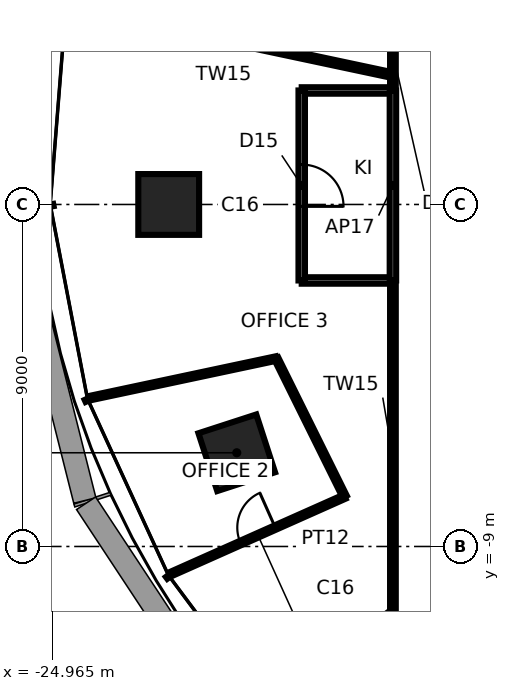
"""IFC4 building model, lengths in metres.
Left out: names, types, materials, properties, quantities, classifications, styles, units other than length and angle.
Written with IfcOpenShell. Run it as: python <this file> out.ifc"""

import sys

from ifc_helpers import new_model, si_unit, direction, frame, frame_2d, origin, origin_2d, place, context, subcontext, project, spatial, rectangle, extrude, element, fill, save


model = new_model("IFC4")
c1 = context("Model", 3, precision=1e-05, world=origin(), true_north=direction((0.0, 1.0)))
c2 = subcontext(c1, "Body", "Model", "MODEL_VIEW")
j1 = project(units=[si_unit("LENGTHUNIT", "METRE"), si_unit("PLANEANGLEUNIT", "RADIAN")], contexts=[c1])
p1 = place(None, origin())
s1 = spatial("IfcSite", under=j1, at=p1, CompositionType="ELEMENT")
p2 = place(p1, origin())
s2 = spatial("IfcBuilding", under=s1, at=p2, CompositionType="ELEMENT")
p3 = place(p2, frame((0.0, 0.0, 115.8)))
s3 = spatial("IfcBuildingStorey", under=s2, at=p3, CompositionType="ELEMENT", Elevation=115.8)
for number, where, z_axis, x_axis in (
    (1, (-21.9, 0.0, 0.0), (0.0, 0.0, 1.0), (-1.0, 0.0, 0.0)),
    (2, (-20.109, -6.534, 0.0), (0.0, 0.0, 1.0), (-0.951, -0.309, 0.0)),
):
    element("IfcColumn", number, at=place(p3, frame(where, z_axis=z_axis, x_axis=x_axis)), inside=s3, PredefinedType="COLUMN", context=c2, shape_type="SweptSolid", body=[
        extrude(rectangle(XDim=1.6, YDim=1.6, at=origin_2d()), origin(), (0.0, 0.0, 1.0), 3.9),
    ])
p4 = place(p3, frame((-18.4, -2.0, 0.0), z_axis=(0.0, 0.0, 1.0), x_axis=(1.0, 0.0, 0.0)))
e3 = element("IfcWall", 3, at=p4, inside=s3, PredefinedType="PARTITIONING", context=c2, shape_type="SweptSolid", body=[
    extrude(rectangle(XDim=2.4, YDim=0.17, at=frame_2d((1.2, 0.0))), origin(), (0.0, 0.0, 1.0), 3.74),
])
p5 = place(p3, frame((-19.07, -4.053, 0.0), z_axis=(0.0, 0.0, 1.0), x_axis=(-0.978149046495, -0.207904888932, 0.0)))
e4 = element("IfcWall", 4, at=p5, inside=s3, PredefinedType="PARTITIONING", context=c2, shape_type="SweptSolid", body=[
    extrude(rectangle(XDim=5.0, YDim=0.12, at=frame_2d((2.5, 0.0))), origin(), (0.0, 0.0, 1.0), 3.74),
])
p6 = place(p3, frame((-17.268, -7.688, 0.0), z_axis=(0.0, 0.0, 1.0), x_axis=(-0.444009146511, 0.896022252968, 0.0)))
e5 = element("IfcWall", 5, at=p6, inside=s3, PredefinedType="PARTITIONING", context=c2, shape_type="SweptSolid", body=[
    extrude(rectangle(XDim=4.057, YDim=0.12, at=frame_2d((2.028, 0.0))), origin(), (0.0, 0.0, 1.0), 3.286),
])
p7 = place(p3, frame((-16.0, -2.0, 0.0), z_axis=(0.0, 0.0, 1.0), x_axis=(0.0, -1.0, 0.0)))
e6 = element("IfcWall", 6, at=p7, inside=s3, PredefinedType="PARTITIONING", context=c2, shape_type="SweptSolid", body=[
    extrude(rectangle(XDim=9.3, YDim=0.15, at=frame_2d((4.65, 0.0))), origin(), (0.0, 0.0, 1.0), 3.74),
])
p8 = place(p3, frame((-21.836, -9.722, 0.0), z_axis=(0.0, 0.0, 1.0), x_axis=(0.913549606868, 0.406727323635, 0.0)))
e7 = element("IfcWall", 7, at=p8, inside=s3, PredefinedType="PARTITIONING", context=c2, shape_type="SweptSolid", body=[
    extrude(rectangle(XDim=5.0, YDim=0.12, at=frame_2d((2.5, 0.0))), origin(), (0.0, 0.0, 1.0), 3.74),
])
p9 = place(p8, frame((2.0, 0.0, 0.0)))
e8 = element("IfcOpeningElement", 8, at=p9, cuts=e7, PredefinedType="OPENING", context=c2, shape_type="SweptSolid", body=[
    extrude(rectangle(XDim=1.0, YDim=2.4, at=frame_2d((0.5, 1.2))), frame((0.0, 0.07, 0.0), z_axis=(0.0, -1.0, 0.0), x_axis=(1.0, 0.0, 0.0)), (0.0, 0.0, 1.0), 0.14),
])
p10 = place(p3, frame((-16.0, 11.3, 0.0), z_axis=(0.0, 0.0, 1.0), x_axis=(0.0, -1.0, 0.0)))
e9 = element("IfcWall", 9, at=p10, inside=s3, PredefinedType="PARTITIONING", context=c2, shape_type="SweptSolid", body=[
    extrude(rectangle(XDim=8.3, YDim=0.15, at=frame_2d((4.15, 0.0))), origin(), (0.0, 0.0, 1.0), 3.74),
])
p11 = place(p3, frame((-16.0, 3.401, 0.0), z_axis=(0.0, 0.0, 1.0), x_axis=(-0.978149592602, 0.207902319596, 0.0)))
e10 = element("IfcWall", 10, at=p11, inside=s3, PredefinedType="PARTITIONING", context=c2, shape_type="SweptSolid", body=[
    extrude(rectangle(XDim=8.713, YDim=0.15, at=frame_2d((4.357, 0.0))), origin(), (0.0, 0.0, 1.0), 3.74),
])
p12 = place(p3, frame((-16.0, 3.0, 0.0), z_axis=(0.0, 0.0, 1.0), x_axis=(-1.0, 0.0, 0.0)))
e11 = element("IfcWall", 11, at=p12, inside=s3, PredefinedType="PARTITIONING", context=c2, shape_type="SweptSolid", body=[
    extrude(rectangle(XDim=2.4, YDim=0.17, at=frame_2d((1.2, 0.0))), origin(), (0.0, 0.0, 1.0), 3.74),
])
p13 = place(p3, frame((-16.0, -2.0, 0.0), z_axis=(0.0, 0.0, 1.0), x_axis=(0.0, 1.0, 0.0)))
e12 = element("IfcWall", 12, at=p13, inside=s3, PredefinedType="PARTITIONING", context=c2, shape_type="SweptSolid", body=[
    extrude(rectangle(XDim=5.0, YDim=0.17, at=frame_2d((2.5, 0.0))), origin(), (0.0, 0.0, 1.0), 3.74),
])
p14 = place(p3, frame((-18.4, 3.0, 0.0), z_axis=(0.0, 0.0, 1.0), x_axis=(0.0, -1.0, 0.0)))
e13 = element("IfcWall", 13, at=p14, inside=s3, PredefinedType="PARTITIONING", context=c2, shape_type="SweptSolid", body=[
    extrude(rectangle(XDim=5.0, YDim=0.17, at=frame_2d((2.5, 0.0))), origin(), (0.0, 0.0, 1.0), 3.74),
])
p15 = place(p14, frame((1.95, 0.0, 0.0)))
e14 = element("IfcOpeningElement", 14, at=p15, cuts=e13, PredefinedType="OPENING", context=c2, shape_type="SweptSolid", body=[
    extrude(rectangle(XDim=1.1, YDim=2.4, at=frame_2d((0.55, 1.2))), frame((0.0, 0.095, 0.0), z_axis=(0.0, -1.0, 0.0), x_axis=(1.0, 0.0, 0.0)), (0.0, 0.0, 1.0), 0.19),
])
p16 = place(p9, origin())
e15 = element("IfcDoor", 15, at=p16, inside=s3, OperationType="SINGLE_SWING_RIGHT", PredefinedType="DOOR", context=c2, shape_type="SweptSolid", body=[
    extrude(rectangle(XDim=1.0, YDim=2.4, at=frame_2d((0.5, 1.2))), frame((0.0, 0.025, 0.0), z_axis=(0.0, -1.0, 0.0), x_axis=(1.0, 0.0, 0.0)), (0.0, 0.0, 1.0), 0.05),
])
fill(e8, e15)
p17 = place(p15, origin())
e16 = element("IfcDoor", 16, at=p17, inside=s3, OperationType="SINGLE_SWING_RIGHT", PredefinedType="DOOR", context=c2, shape_type="SweptSolid", body=[
    extrude(rectangle(XDim=1.1, YDim=2.4, at=frame_2d((0.55, 1.2))), frame((0.0, 0.025, 0.0), z_axis=(0.0, -1.0, 0.0), x_axis=(1.0, 0.0, 0.0)), (0.0, 0.0, 1.0), 0.05),
])
fill(e14, e16)
save(model, sys.argv[1])
